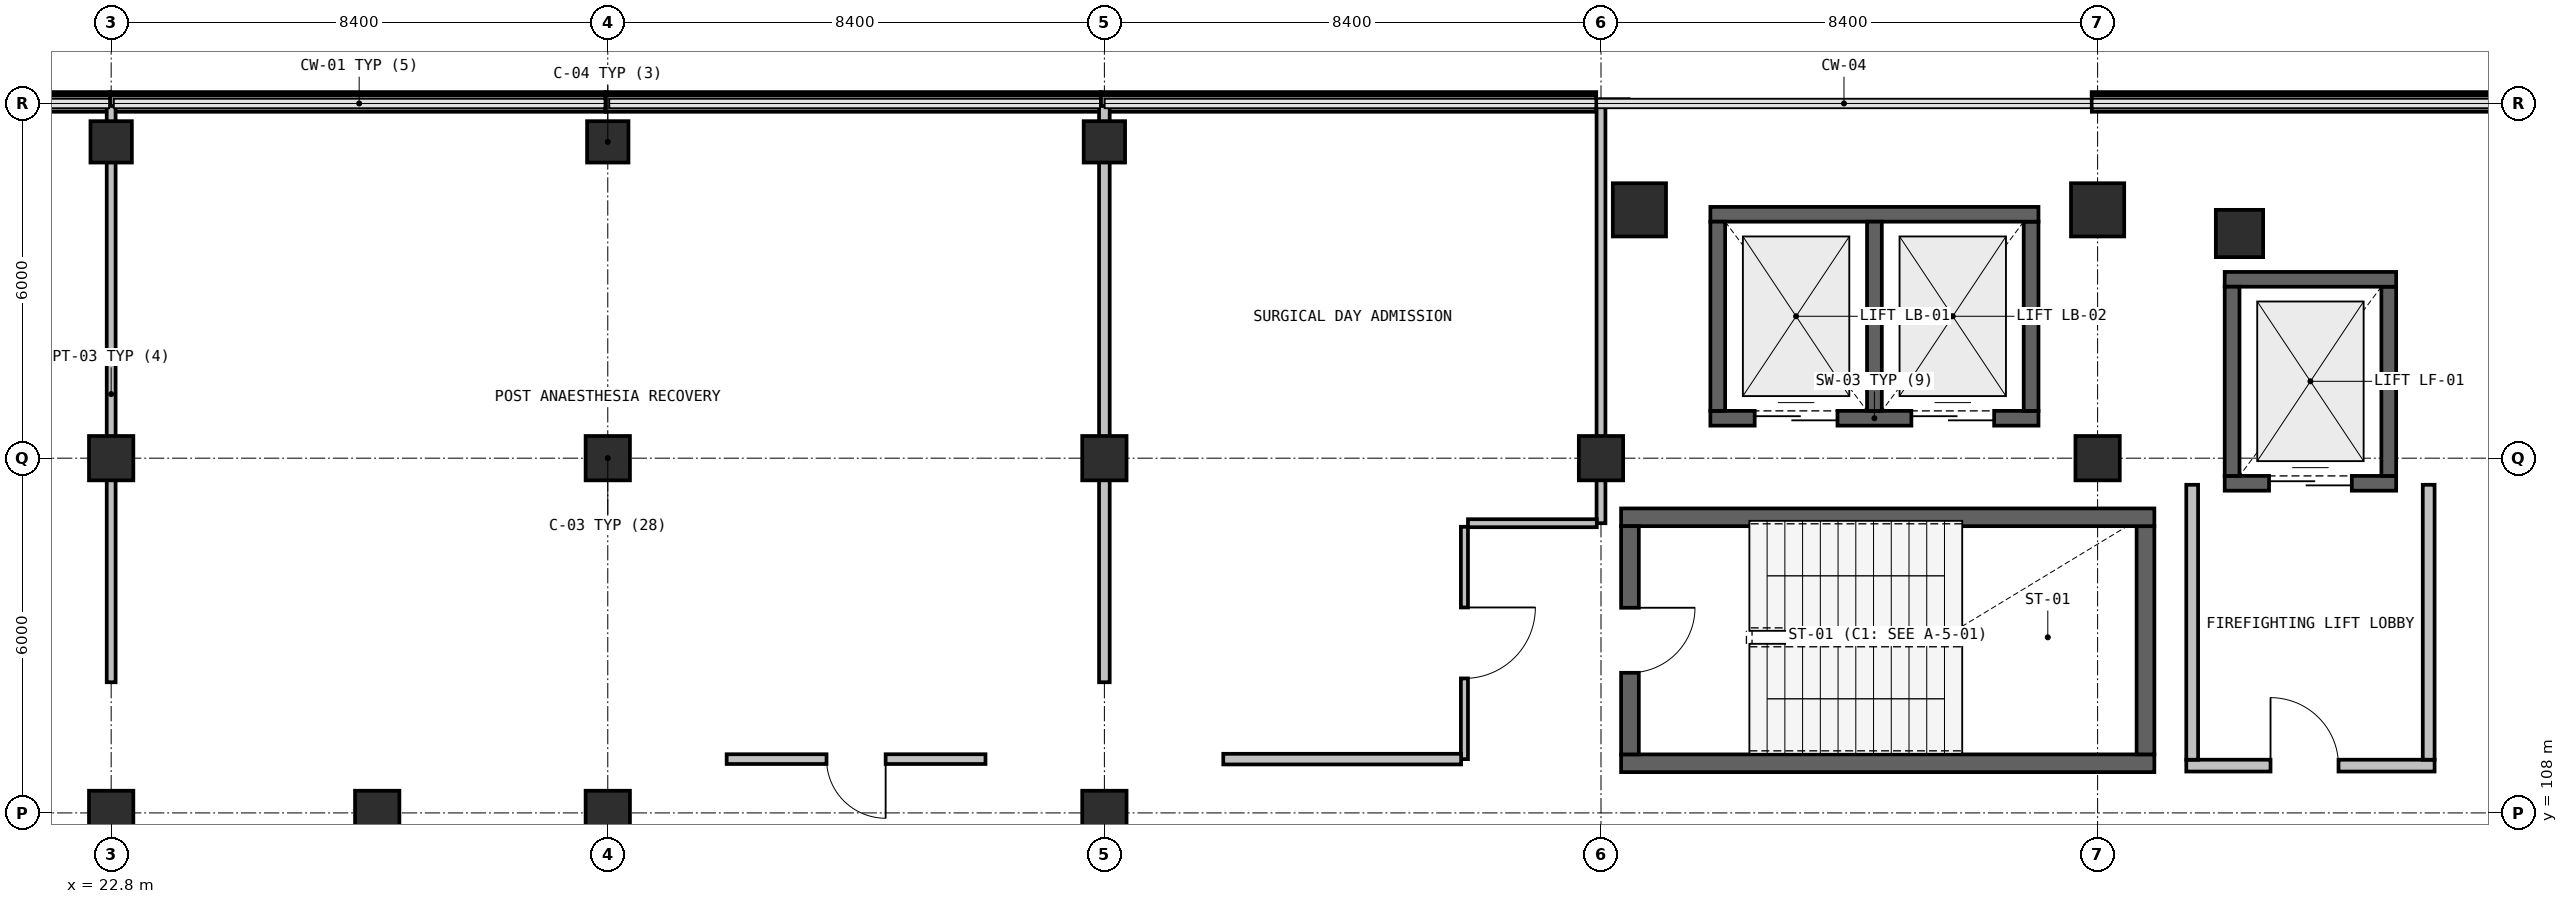
"""IFC4 building model, lengths in metres.
Left out: names, types, materials, properties, quantities, classifications, styles, units other than length and angle.
Written with IfcOpenShell. Run it as: python <this file> out.ifc"""

import sys

from ifc_helpers import new_model, si_unit, direction, frame, frame_2d, origin, origin_2d, place, context, subcontext, project, spatial, rectangle, extrude, element, fill, save


model = new_model("IFC4")
c1 = context("Model", 3, precision=1e-05, world=origin(), true_north=direction((0.0, 1.0)))
c2 = subcontext(c1, "Body", "Model", "MODEL_VIEW")
j1 = project(units=[si_unit("LENGTHUNIT", "METRE"), si_unit("PLANEANGLEUNIT", "RADIAN")], contexts=[c1])
p1 = place(None, origin())
s1 = spatial("IfcSite", under=j1, at=p1, CompositionType="ELEMENT")
p2 = place(p1, origin())
s2 = spatial("IfcBuilding", under=s1, at=p2, CompositionType="ELEMENT")
p3 = place(p2, frame((0.0, 0.0, 10.2)))
s3 = spatial("IfcBuildingStorey", under=s2, at=p3, CompositionType="ELEMENT", Elevation=10.2)
p4 = place(p3, frame((58.8, 117.8, 0.0), z_axis=(0.0, 0.0, 1.0), x_axis=(1.0, 0.0, 0.0)))
e1 = element("IfcColumn", 1, at=p4, inside=s3, PredefinedType="COLUMN", context=c2, shape_type="SweptSolid", body=[
    extrude(rectangle(XDim=0.8, YDim=0.8, at=origin_2d()), origin(), (0.0, 0.0, 1.0), 4.8),
])
for number, where, z_axis, x_axis in (
    (2, (48.65, 118.2, 0.0), (0.0, 0.0, 1.0), (1.0, 0.0, 0.0)),
    (3, (56.4, 118.2, 0.0), (0.0, 0.0, 1.0), (1.0, 0.0, 0.0)),
):
    element("IfcColumn", number, at=place(p3, frame(where, z_axis=z_axis, x_axis=x_axis)), inside=s3, PredefinedType="COLUMN", context=c2, shape_type="SweptSolid", body=[
        extrude(rectangle(XDim=0.9, YDim=0.9, at=origin_2d()), origin(), (0.0, 0.0, 1.0), 4.8),
    ])
for number, where, z_axis, x_axis in (
    (4, (27.3, 108.0, 0.0), (0.0, 0.0, 1.0), (1.0, 0.0, 0.0)),
    (5, (22.8, 108.0, 0.0), (0.0, 0.0, 1.0), (1.0, 0.0, 0.0)),
    (6, (22.8, 114.0, 0.0), (0.0, 0.0, 1.0), (1.0, 0.0, 0.0)),
):
    element("IfcColumn", number, at=place(p3, frame(where, z_axis=z_axis, x_axis=x_axis)), inside=s3, PredefinedType="COLUMN", context=c2, shape_type="SweptSolid", body=[
        extrude(rectangle(XDim=0.75, YDim=0.75, at=origin_2d()), origin(), (0.0, 0.0, 1.0), 4.8),
    ])
p5 = place(p3, frame((22.8, 119.35, 0.0), z_axis=(0.0, 0.0, 1.0), x_axis=(1.0, 0.0, 0.0)))
e7 = element("IfcColumn", 7, at=p5, inside=s3, PredefinedType="COLUMN", context=c2, shape_type="SweptSolid", body=[
    extrude(rectangle(XDim=0.7, YDim=0.7, at=origin_2d()), origin(), (0.0, 0.0, 1.0), 4.8),
])
for number, where, z_axis, x_axis in (
    (8, (31.2, 108.0, 0.0), (0.0, 0.0, 1.0), (1.0, 0.0, 0.0)),
    (9, (31.2, 114.0, 0.0), (0.0, 0.0, 1.0), (1.0, 0.0, 0.0)),
):
    element("IfcColumn", number, at=place(p3, frame(where, z_axis=z_axis, x_axis=x_axis)), inside=s3, PredefinedType="COLUMN", context=c2, shape_type="SweptSolid", body=[
        extrude(rectangle(XDim=0.75, YDim=0.75, at=origin_2d()), origin(), (0.0, 0.0, 1.0), 4.8),
    ])
p6 = place(p3, frame((31.2, 119.35, 0.0), z_axis=(0.0, 0.0, 1.0), x_axis=(1.0, 0.0, 0.0)))
e10 = element("IfcColumn", 10, at=p6, inside=s3, PredefinedType="COLUMN", context=c2, shape_type="SweptSolid", body=[
    extrude(rectangle(XDim=0.7, YDim=0.7, at=origin_2d()), origin(), (0.0, 0.0, 1.0), 4.8),
])
for number, where, z_axis, x_axis in (
    (11, (39.6, 108.0, 0.0), (0.0, 0.0, 1.0), (1.0, 0.0, 0.0)),
    (12, (39.6, 114.0, 0.0), (0.0, 0.0, 1.0), (1.0, 0.0, 0.0)),
):
    element("IfcColumn", number, at=place(p3, frame(where, z_axis=z_axis, x_axis=x_axis)), inside=s3, PredefinedType="COLUMN", context=c2, shape_type="SweptSolid", body=[
        extrude(rectangle(XDim=0.75, YDim=0.75, at=origin_2d()), origin(), (0.0, 0.0, 1.0), 4.8),
    ])
p7 = place(p3, frame((39.6, 119.35, 0.0), z_axis=(0.0, 0.0, 1.0), x_axis=(1.0, 0.0, 0.0)))
e13 = element("IfcColumn", 13, at=p7, inside=s3, PredefinedType="COLUMN", context=c2, shape_type="SweptSolid", body=[
    extrude(rectangle(XDim=0.7, YDim=0.7, at=origin_2d()), origin(), (0.0, 0.0, 1.0), 4.8),
])
for number, where, z_axis, x_axis in (
    (14, (48.0, 114.0, 0.0), (0.0, 0.0, 1.0), (1.0, 0.0, 0.0)),
    (15, (56.4, 114.0, 0.0), (0.0, 0.0, 1.0), (1.0, 0.0, 0.0)),
):
    element("IfcColumn", number, at=place(p3, frame(where, z_axis=z_axis, x_axis=x_axis)), inside=s3, PredefinedType="COLUMN", context=c2, shape_type="SweptSolid", body=[
        extrude(rectangle(XDim=0.75, YDim=0.75, at=origin_2d()), origin(), (0.0, 0.0, 1.0), 4.8),
    ])
p8 = place(p3, frame((14.54, 119.999, 0.0), z_axis=(0.0, 0.0, 1.0), x_axis=(1.0, 0.0, 0.0)))
e16 = element("IfcWall", 16, at=p8, inside=s3, PredefinedType="SOLIDWALL", context=c2, shape_type="SweptSolid", body=[
    extrude(rectangle(XDim=8.238, YDim=0.28, at=frame_2d((4.119, 0.0))), origin(), (0.0, 0.0, 1.0), 0.94),
])
for number, where, z_axis, x_axis in (
    (17, (22.782, 119.999, 0.0), (0.0, 0.0, 1.0), (1.0, 0.0, 0.0)),
    (18, (31.162, 119.999, 0.0), (0.0, 0.0, 1.0), (1.0, 0.0, 0.0)),
    (19, (39.542, 119.999, 0.0), (0.0, 0.0, 1.0), (1.0, 0.0, 0.0)),
    (20, (56.302, 119.999, 0.0), (0.0, 0.0, 1.0), (1.0, 0.0, 0.0)),
):
    element("IfcWall", number, at=place(p3, frame(where, z_axis=z_axis, x_axis=x_axis)), inside=s3, PredefinedType="SOLIDWALL", context=c2, shape_type="SweptSolid", body=[
        extrude(rectangle(XDim=8.376, YDim=0.28, at=frame_2d((4.188, 0.0))), origin(), (0.0, 0.0, 1.0), 0.94),
    ])
p9 = place(p3, frame((48.34, 108.84, 0.0), z_axis=(0.0, 0.0, 1.0), x_axis=(1.0, 0.0, 0.0)))
e21 = element("IfcWall", 21, at=p9, inside=s3, PredefinedType="SHEAR", context=c2, shape_type="SweptSolid", body=[
    extrude(rectangle(XDim=9.02, YDim=0.3, at=frame_2d((4.51, 0.0))), origin(), (0.0, 0.0, 1.0), 4.46),
])
p10 = place(p3, frame((57.21, 108.99, 0.0), z_axis=(0.0, 0.0, 1.0), x_axis=(0.0, 1.0, 0.0)))
e22 = element("IfcWall", 22, at=p10, inside=s3, PredefinedType="SHEAR", context=c2, shape_type="SweptSolid", body=[
    extrude(rectangle(XDim=3.86, YDim=0.3, at=frame_2d((1.93, 0.0))), origin(), (0.0, 0.0, 1.0), 4.46),
])
p11 = place(p3, frame((57.36, 113.0, 0.0), z_axis=(0.0, 0.0, 1.0), x_axis=(-1.0, 0.0, 0.0)))
e23 = element("IfcWall", 23, at=p11, inside=s3, PredefinedType="SHEAR", context=c2, shape_type="SweptSolid", body=[
    extrude(rectangle(XDim=9.02, YDim=0.3, at=frame_2d((4.51, 0.0))), origin(), (0.0, 0.0, 1.0), 4.46),
])
p12 = place(p3, frame((48.49, 112.85, 0.0), z_axis=(0.0, 0.0, 1.0), x_axis=(0.0, -1.0, 0.0)))
e24 = element("IfcWall", 24, at=p12, inside=s3, PredefinedType="SHEAR", context=c2, shape_type="SweptSolid", body=[
    extrude(rectangle(XDim=3.86, YDim=0.3, at=frame_2d((1.93, 0.0))), origin(), (0.0, 0.0, 1.0), 4.46),
])
p13 = place(p12, frame((1.38, 0.0, 0.0)))
e25 = element("IfcOpeningElement", 25, at=p13, cuts=e24, PredefinedType="OPENING", context=c2, shape_type="SweptSolid", body=[
    extrude(rectangle(XDim=1.1, YDim=2.15, at=frame_2d((0.55, 1.075))), frame((0.0, 0.16, 0.0), z_axis=(0.0, -1.0, 0.0), x_axis=(1.0, 0.0, 0.0)), (0.0, 0.0, 1.0), 0.32),
])
p14 = place(p3, frame((57.9, 108.8, 0.0), z_axis=(0.0, 0.0, 1.0), x_axis=(1.0, 0.0, 0.0)))
e26 = element("IfcWall", 26, at=p14, inside=s3, PredefinedType="SOLIDWALL", context=c2, shape_type="SweptSolid", body=[
    extrude(rectangle(XDim=4.2, YDim=0.2, at=frame_2d((2.1, 0.0))), origin(), (0.0, 0.0, 1.0), 4.46),
])
p15 = place(p14, frame((1.425, 0.0, 0.0)))
e27 = element("IfcOpeningElement", 27, at=p15, cuts=e26, PredefinedType="OPENING", context=c2, shape_type="SweptSolid", body=[
    extrude(rectangle(XDim=1.15, YDim=2.15, at=frame_2d((0.575, 1.075))), frame((0.0, 0.11, 0.0), z_axis=(0.0, -1.0, 0.0), x_axis=(1.0, 0.0, 0.0)), (0.0, 0.0, 1.0), 0.22),
])
for number, where, z_axis, x_axis in (
    (28, (62.0, 108.9, 0.0), (0.0, 0.0, 1.0), (0.0, 1.0, 0.0)),
    (29, (58.0, 113.55, 0.0), (0.0, 0.0, 1.0), (0.0, -1.0, 0.0)),
):
    element("IfcWall", number, at=place(p3, frame(where, z_axis=z_axis, x_axis=x_axis)), inside=s3, PredefinedType="SOLIDWALL", context=c2, shape_type="SweptSolid", body=[
        extrude(rectangle(XDim=4.65, YDim=0.2, at=frame_2d((2.325, 0.0))), origin(), (0.0, 0.0, 1.0), 4.46),
    ])
p16 = place(p3, frame((58.55, 113.575, 0.0), z_axis=(0.0, 0.0, 1.0), x_axis=(1.0, 0.0, 0.0)))
e30 = element("IfcWall", 30, at=p16, inside=s3, PredefinedType="SHEAR", context=c2, shape_type="SweptSolid", body=[
    extrude(rectangle(XDim=2.9, YDim=0.25, at=frame_2d((1.45, 0.0))), origin(), (0.0, 0.0, 1.0), 4.46),
])
p17 = place(p16, frame((0.75, 0.0, 0.0)))
e31 = element("IfcOpeningElement", 31, at=p17, cuts=e30, PredefinedType="OPENING", context=c2, shape_type="SweptSolid", body=[
    extrude(rectangle(XDim=1.4, YDim=2.15, at=frame_2d((0.7, 1.075))), frame((0.0, 0.135, 0.0), z_axis=(0.0, -1.0, 0.0), x_axis=(1.0, 0.0, 0.0)), (0.0, 0.0, 1.0), 0.27),
])
p18 = place(p3, frame((61.325, 113.7, 0.0), z_axis=(0.0, 0.0, 1.0), x_axis=(0.0, 1.0, 0.0)))
e32 = element("IfcWall", 32, at=p18, inside=s3, PredefinedType="SHEAR", context=c2, shape_type="SweptSolid", body=[
    extrude(rectangle(XDim=3.2, YDim=0.25, at=frame_2d((1.6, 0.0))), origin(), (0.0, 0.0, 1.0), 4.46),
])
p19 = place(p3, frame((61.45, 117.025, 0.0), z_axis=(0.0, 0.0, 1.0), x_axis=(-1.0, 0.0, 0.0)))
e33 = element("IfcWall", 33, at=p19, inside=s3, PredefinedType="SHEAR", context=c2, shape_type="SweptSolid", body=[
    extrude(rectangle(XDim=2.9, YDim=0.25, at=frame_2d((1.45, 0.0))), origin(), (0.0, 0.0, 1.0), 4.46),
])
p20 = place(p3, frame((58.675, 116.9, 0.0), z_axis=(0.0, 0.0, 1.0), x_axis=(0.0, -1.0, 0.0)))
e34 = element("IfcWall", 34, at=p20, inside=s3, PredefinedType="SHEAR", context=c2, shape_type="SweptSolid", body=[
    extrude(rectangle(XDim=3.2, YDim=0.25, at=frame_2d((1.6, 0.0))), origin(), (0.0, 0.0, 1.0), 4.46),
])
p21 = place(p3, frame((49.85, 114.675, 0.0), z_axis=(0.0, 0.0, 1.0), x_axis=(1.0, 0.0, 0.0)))
e35 = element("IfcWall", 35, at=p21, inside=s3, PredefinedType="SHEAR", context=c2, shape_type="SweptSolid", body=[
    extrude(rectangle(XDim=5.55, YDim=0.25, at=frame_2d((2.775, 0.0))), origin(), (0.0, 0.0, 1.0), 4.46),
])
p22 = place(p21, frame((0.75, 0.0, 0.0)))
e36 = element("IfcOpeningElement", 36, at=p22, cuts=e35, PredefinedType="OPENING", context=c2, shape_type="SweptSolid", body=[
    extrude(rectangle(XDim=1.4, YDim=2.2, at=frame_2d((0.7, 1.1))), frame((0.0, 0.135, 0.0), z_axis=(0.0, -1.0, 0.0), x_axis=(1.0, 0.0, 0.0)), (0.0, 0.0, 1.0), 0.27),
])
p23 = place(p21, frame((3.4, 0.0, 0.0)))
e37 = element("IfcOpeningElement", 37, at=p23, cuts=e35, PredefinedType="OPENING", context=c2, shape_type="SweptSolid", body=[
    extrude(rectangle(XDim=1.4, YDim=2.2, at=frame_2d((0.7, 1.1))), frame((0.0, 0.135, 0.0), z_axis=(0.0, -1.0, 0.0), x_axis=(1.0, 0.0, 0.0)), (0.0, 0.0, 1.0), 0.27),
])
p24 = place(p3, frame((55.275, 114.8, 0.0), z_axis=(0.0, 0.0, 1.0), x_axis=(0.0, 1.0, 0.0)))
e38 = element("IfcWall", 38, at=p24, inside=s3, PredefinedType="SHEAR", context=c2, shape_type="SweptSolid", body=[
    extrude(rectangle(XDim=3.2, YDim=0.25, at=frame_2d((1.6, 0.0))), origin(), (0.0, 0.0, 1.0), 4.46),
])
p25 = place(p3, frame((55.4, 118.125, 0.0), z_axis=(0.0, 0.0, 1.0), x_axis=(-1.0, 0.0, 0.0)))
e39 = element("IfcWall", 39, at=p25, inside=s3, PredefinedType="SHEAR", context=c2, shape_type="SweptSolid", body=[
    extrude(rectangle(XDim=5.55, YDim=0.25, at=frame_2d((2.775, 0.0))), origin(), (0.0, 0.0, 1.0), 4.46),
])
for number, where, z_axis, x_axis in (
    (40, (49.975, 118.0, 0.0), (0.0, 0.0, 1.0), (0.0, -1.0, 0.0)),
    (41, (52.625, 114.8, 0.0), (0.0, 0.0, 1.0), (0.0, 1.0, 0.0)),
):
    element("IfcWall", number, at=place(p3, frame(where, z_axis=z_axis, x_axis=x_axis)), inside=s3, PredefinedType="SHEAR", context=c2, shape_type="SweptSolid", body=[
        extrude(rectangle(XDim=3.2, YDim=0.25, at=frame_2d((1.6, 0.0))), origin(), (0.0, 0.0, 1.0), 4.46),
    ])
p26 = place(p3, frame((22.8, 119.957, 0.0), z_axis=(0.0, 0.0, 1.0), x_axis=(0.0, -1.0, 0.0)))
e42 = element("IfcWall", 42, at=p26, inside=s3, PredefinedType="PARTITIONING", context=c2, shape_type="SweptSolid", body=[
    extrude(rectangle(XDim=9.747, YDim=0.15, at=frame_2d((4.874, 0.0))), origin(), (0.0, 0.0, 1.0), 3.81),
])
p27 = place(p3, frame((39.6, 119.957, 0.0), z_axis=(0.0, 0.0, 1.0), x_axis=(0.0, -1.0, 0.0)))
e43 = element("IfcWall", 43, at=p27, inside=s3, PredefinedType="PARTITIONING", context=c2, shape_type="SweptSolid", body=[
    extrude(rectangle(XDim=9.747, YDim=0.18, at=frame_2d((4.874, 0.0))), origin(), (0.0, 0.0, 1.0), 3.81),
])
p28 = place(p3, frame((37.589, 108.91, 0.0), z_axis=(0.0, 0.0, 1.0), x_axis=(-1.0, 0.0, 0.0)))
e44 = element("IfcWall", 44, at=p28, inside=s3, PredefinedType="PARTITIONING", context=c2, shape_type="SweptSolid", body=[
    extrude(rectangle(XDim=4.378, YDim=0.165, at=frame_2d((2.189, 0.0))), origin(), (0.0, 0.0, 1.0), 4.46),
])
p29 = place(p28, frame((1.689, 0.0, 0.0)))
e45 = element("IfcOpeningElement", 45, at=p29, cuts=e44, PredefinedType="OPENING", context=c2, shape_type="SweptSolid", body=[
    extrude(rectangle(XDim=1.0, YDim=2.15, at=frame_2d((0.5, 1.075))), frame((0.0, 0.093, 0.0), z_axis=(0.0, -1.0, 0.0), x_axis=(1.0, 0.0, 0.0)), (0.0, 0.0, 1.0), 0.185),
])
p30 = place(p3, frame((48.0, 119.988, 0.0), z_axis=(0.0, 0.0, 1.0), x_axis=(0.0, -1.0, 0.0)))
e46 = element("IfcWall", 46, at=p30, inside=s3, PredefinedType="PARTITIONING", context=c2, shape_type="SweptSolid", body=[
    extrude(rectangle(XDim=7.088, YDim=0.15, at=frame_2d((3.544, 0.0))), origin(), (0.0, 0.0, 1.0), 3.81),
])
p31 = place(p3, frame((47.929, 112.9, 0.0), z_axis=(0.0, 0.0, 1.0), x_axis=(-1.0, 0.0, 0.0)))
e47 = element("IfcWall", 47, at=p31, inside=s3, PredefinedType="PARTITIONING", context=c2, shape_type="SweptSolid", body=[
    extrude(rectangle(XDim=2.179, YDim=0.135, at=frame_2d((1.089, 0.0))), origin(), (0.0, 0.0, 1.0), 4.46),
])
p32 = place(p3, frame((45.69, 112.84, 0.0), z_axis=(0.0, 0.0, 1.0), x_axis=(0.0, -1.0, 0.0)))
e48 = element("IfcWall", 48, at=p32, inside=s3, PredefinedType="PARTITIONING", context=c2, shape_type="SweptSolid", body=[
    extrude(rectangle(XDim=3.93, YDim=0.12, at=frame_2d((1.965, 0.0))), origin(), (0.0, 0.0, 1.0), 4.46),
])
p33 = place(p32, frame((1.365, 0.0, 0.0)))
e49 = element("IfcOpeningElement", 49, at=p33, cuts=e48, PredefinedType="OPENING", context=c2, shape_type="SweptSolid", body=[
    extrude(rectangle(XDim=1.2, YDim=2.15, at=frame_2d((0.6, 1.075))), frame((0.0, 0.07, 0.0), z_axis=(0.0, -1.0, 0.0), x_axis=(1.0, 0.0, 0.0)), (0.0, 0.0, 1.0), 0.14),
])
p34 = place(p3, frame((45.634, 108.91, 0.0), z_axis=(0.0, 0.0, 1.0), x_axis=(-1.0, 0.0, 0.0)))
e50 = element("IfcWall", 50, at=p34, inside=s3, PredefinedType="PARTITIONING", context=c2, shape_type="SweptSolid", body=[
    extrude(rectangle(XDim=4.023, YDim=0.18, at=frame_2d((2.011, 0.0))), origin(), (0.0, 0.0, 1.0), 4.46),
])
p35 = place(p13, origin())
e51 = element("IfcDoor", 51, at=p35, inside=s3, OperationType="SINGLE_SWING_RIGHT", PredefinedType="DOOR", context=c2, shape_type="SweptSolid", body=[
    extrude(rectangle(XDim=1.1, YDim=2.15, at=frame_2d((0.55, 1.075))), frame((0.0, 0.025, 0.0), z_axis=(0.0, -1.0, 0.0), x_axis=(1.0, 0.0, 0.0)), (0.0, 0.0, 1.0), 0.05),
])
fill(e25, e51)
p36 = place(p15, origin())
e52 = element("IfcDoor", 52, at=p36, inside=s3, OperationType="SINGLE_SWING_LEFT", PredefinedType="DOOR", context=c2, shape_type="SweptSolid", body=[
    extrude(rectangle(XDim=1.15, YDim=2.15, at=frame_2d((0.575, 1.075))), frame((0.0, 0.025, 0.0), z_axis=(0.0, -1.0, 0.0), x_axis=(1.0, 0.0, 0.0)), (0.0, 0.0, 1.0), 0.05),
])
fill(e27, e52)
p37 = place(p17, origin())
e53 = element("IfcDoor", 53, at=p37, inside=s3, OperationType="DOUBLE_DOOR_SLIDING", PredefinedType="DOOR", context=c2, shape_type="SweptSolid", body=[
    extrude(rectangle(XDim=1.4, YDim=2.15, at=frame_2d((0.7, 1.075))), frame((0.0, 0.025, 0.0), z_axis=(0.0, -1.0, 0.0), x_axis=(1.0, 0.0, 0.0)), (0.0, 0.0, 1.0), 0.05),
])
fill(e31, e53)
p38 = place(p22, origin())
e54 = element("IfcDoor", 54, at=p38, inside=s3, OperationType="DOUBLE_DOOR_SLIDING", PredefinedType="DOOR", context=c2, shape_type="SweptSolid", body=[
    extrude(rectangle(XDim=1.4, YDim=2.2, at=frame_2d((0.7, 1.1))), frame((0.0, 0.025, 0.0), z_axis=(0.0, -1.0, 0.0), x_axis=(1.0, 0.0, 0.0)), (0.0, 0.0, 1.0), 0.05),
])
fill(e36, e54)
p39 = place(p23, origin())
e55 = element("IfcDoor", 55, at=p39, inside=s3, OperationType="DOUBLE_DOOR_SLIDING", PredefinedType="DOOR", context=c2, shape_type="SweptSolid", body=[
    extrude(rectangle(XDim=1.4, YDim=2.2, at=frame_2d((0.7, 1.1))), frame((0.0, 0.025, 0.0), z_axis=(0.0, -1.0, 0.0), x_axis=(1.0, 0.0, 0.0)), (0.0, 0.0, 1.0), 0.05),
])
fill(e37, e55)
p40 = place(p29, origin())
e56 = element("IfcDoor", 56, at=p40, inside=s3, OperationType="SINGLE_SWING_RIGHT", PredefinedType="DOOR", context=c2, shape_type="SweptSolid", body=[
    extrude(rectangle(XDim=1.0, YDim=2.15, at=frame_2d((0.5, 1.075))), frame((0.0, 0.025, 0.0), z_axis=(0.0, -1.0, 0.0), x_axis=(1.0, 0.0, 0.0)), (0.0, 0.0, 1.0), 0.05),
])
fill(e45, e56)
p41 = place(p33, origin())
e57 = element("IfcDoor", 57, at=p41, inside=s3, OperationType="SINGLE_SWING_LEFT", PredefinedType="DOOR", context=c2, shape_type="SweptSolid", body=[
    extrude(rectangle(XDim=1.2, YDim=2.15, at=frame_2d((0.6, 1.075))), frame((0.0, 0.025, 0.0), z_axis=(0.0, -1.0, 0.0), x_axis=(1.0, 0.0, 0.0)), (0.0, 0.0, 1.0), 0.05),
])
fill(e49, e57)
save(model, sys.argv[1])
